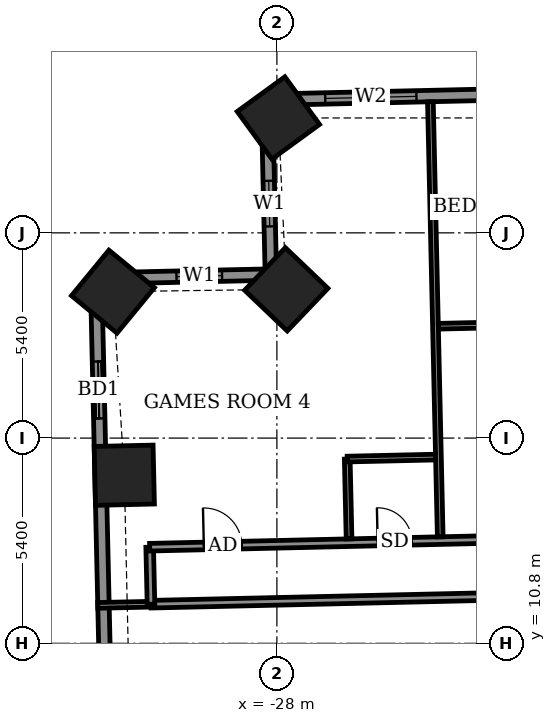
"""IFC4 building model, lengths in metres.
Left out: names, types, materials, properties, quantities, classifications, styles, units other than length and angle.
Written with IfcOpenShell. Run it as: python <this file> out.ifc"""

import sys

from ifc_helpers import new_model, si_unit, direction, frame, frame_2d, origin, origin_2d, place, context, subcontext, project, spatial, rectangle, extrude, element, fill, save


model = new_model("IFC4")
c1 = context("Model", 3, precision=1e-05, world=origin(), true_north=direction((0.0, 1.0)))
c2 = subcontext(c1, "Body", "Model", "MODEL_VIEW")
j1 = project(units=[si_unit("LENGTHUNIT", "METRE"), si_unit("PLANEANGLEUNIT", "RADIAN")], contexts=[c1])
p1 = place(None, origin())
s1 = spatial("IfcSite", under=j1, at=p1, CompositionType="ELEMENT")
p2 = place(p1, origin())
s2 = spatial("IfcBuilding", under=s1, at=p2, CompositionType="ELEMENT")
p3 = place(p2, frame((0.0, 0.0, 34.1)))
s3 = spatial("IfcBuildingStorey", under=s2, at=p3, CompositionType="ELEMENT", Elevation=34.1)
for number, where, z_axis, x_axis in (
    (1, (-27.961, 24.623, -0.55), (0.0, 0.0, 1.0), (-0.808, -0.589, 0.0)),
    (2, (-27.753, 20.115, -0.55), (0.0, 0.0, 1.0), (-0.691, -0.723, 0.0)),
    (3, (-32.313, 20.053, -0.55), (0.0, 0.0, 1.0), (-0.635, -0.772, 0.0)),
    (4, (-32.015, 15.223, -0.55), (0.0, 0.0, 1.0), (0.023, -1.0, 0.0)),
):
    element("IfcColumn", number, at=place(p3, frame(where, z_axis=z_axis, x_axis=x_axis)), inside=s3, PredefinedType="COLUMN", context=c2, shape_type="SweptSolid", body=[
        extrude(rectangle(XDim=1.55, YDim=1.55, at=origin_2d()), origin(), (0.0, 0.0, 1.0), 3.6),
    ])
p4 = place(p3, frame((24.423, 26.298, 0.0), z_axis=(0.0, 0.0, 1.0), x_axis=(-0.999742433108, -0.022695097355, 0.0)))
e5 = element("IfcWall", 5, at=p4, inside=s3, PredefinedType="SOLIDWALL", context=c2, shape_type="SweptSolid", body=[
    extrude(rectangle(XDim=52.701, YDim=0.3, at=frame_2d((26.35, 0.0))), origin(), (0.0, 0.0, 1.0), 3.05),
])
p5 = place(p4, frame((2.357, 0.0, 0.0)))
e6 = element("IfcOpeningElement", 6, at=p5, cuts=e5, PredefinedType="OPENING", context=c2, shape_type="SweptSolid", body=[
    extrude(rectangle(XDim=1.5, YDim=2.4, at=frame_2d((0.75, 1.2))), frame((0.0, 0.16, 0.0), z_axis=(0.0, -1.0, 0.0), x_axis=(1.0, 0.0, 0.0)), (0.0, 0.0, 1.0), 0.32),
])
p6 = place(p4, frame((7.475, 0.0, 0.0)))
e7 = element("IfcOpeningElement", 7, at=p6, cuts=e5, PredefinedType="OPENING", context=c2, shape_type="SweptSolid", body=[
    extrude(rectangle(XDim=1.5, YDim=2.4, at=frame_2d((0.75, 1.2))), frame((0.0, 0.16, 0.0), z_axis=(0.0, -1.0, 0.0), x_axis=(1.0, 0.0, 0.0)), (0.0, 0.0, 1.0), 0.32),
])
p7 = place(p4, frame((10.262, 0.0, 0.0)))
e8 = element("IfcOpeningElement", 8, at=p7, cuts=e5, PredefinedType="OPENING", context=c2, shape_type="SweptSolid", body=[
    extrude(rectangle(XDim=1.5, YDim=2.4, at=frame_2d((0.75, 1.2))), frame((0.0, 0.16, 0.0), z_axis=(0.0, -1.0, 0.0), x_axis=(1.0, 0.0, 0.0)), (0.0, 0.0, 1.0), 0.32),
])
p8 = place(p4, frame((15.1, 0.0, 0.0)))
e9 = element("IfcOpeningElement", 9, at=p8, cuts=e5, PredefinedType="OPENING", context=c2, shape_type="SweptSolid", body=[
    extrude(rectangle(XDim=1.5, YDim=2.4, at=frame_2d((0.75, 1.2))), frame((0.0, 0.16, 0.0), z_axis=(0.0, -1.0, 0.0), x_axis=(1.0, 0.0, 0.0)), (0.0, 0.0, 1.0), 0.32),
])
p9 = place(p4, frame((20.7, 0.0, 0.0)))
e10 = element("IfcOpeningElement", 10, at=p9, cuts=e5, PredefinedType="OPENING", context=c2, shape_type="SweptSolid", body=[
    extrude(rectangle(XDim=1.2, YDim=2.4, at=frame_2d((0.6, 1.2))), frame((0.0, 0.16, 0.0), z_axis=(0.0, -1.0, 0.0), x_axis=(1.0, 0.0, 0.0)), (0.0, 0.0, 1.0), 0.32),
])
p10 = place(p4, frame((23.337, 0.0, 0.0)))
e11 = element("IfcOpeningElement", 11, at=p10, cuts=e5, PredefinedType="OPENING", context=c2, shape_type="SweptSolid", body=[
    extrude(rectangle(XDim=1.5, YDim=2.4, at=frame_2d((0.75, 1.2))), frame((0.0, 0.16, 0.0), z_axis=(0.0, -1.0, 0.0), x_axis=(1.0, 0.0, 0.0)), (0.0, 0.0, 1.0), 0.32),
])
p11 = place(p4, frame((28.238, 0.0, 0.0)))
e12 = element("IfcOpeningElement", 12, at=p11, cuts=e5, PredefinedType="OPENING", context=c2, shape_type="SweptSolid", body=[
    extrude(rectangle(XDim=1.5, YDim=2.4, at=frame_2d((0.75, 1.2))), frame((0.0, 0.16, 0.0), z_axis=(0.0, -1.0, 0.0), x_axis=(1.0, 0.0, 0.0)), (0.0, 0.0, 1.0), 0.32),
])
p12 = place(p4, frame((33.9, 0.0, 0.0)))
e13 = element("IfcOpeningElement", 13, at=p12, cuts=e5, PredefinedType="OPENING", context=c2, shape_type="SweptSolid", body=[
    extrude(rectangle(XDim=1.2, YDim=2.4, at=frame_2d((0.6, 1.2))), frame((0.0, 0.16, 0.0), z_axis=(0.0, -1.0, 0.0), x_axis=(1.0, 0.0, 0.0)), (0.0, 0.0, 1.0), 0.32),
])
p13 = place(p4, frame((36.538, 0.0, 0.0)))
e14 = element("IfcOpeningElement", 14, at=p13, cuts=e5, PredefinedType="OPENING", context=c2, shape_type="SweptSolid", body=[
    extrude(rectangle(XDim=1.5, YDim=2.4, at=frame_2d((0.75, 1.2))), frame((0.0, 0.16, 0.0), z_axis=(0.0, -1.0, 0.0), x_axis=(1.0, 0.0, 0.0)), (0.0, 0.0, 1.0), 0.32),
])
p14 = place(p4, frame((41.338, 0.0, 0.0)))
e15 = element("IfcOpeningElement", 15, at=p14, cuts=e5, PredefinedType="OPENING", context=c2, shape_type="SweptSolid", body=[
    extrude(rectangle(XDim=1.5, YDim=2.4, at=frame_2d((0.75, 1.2))), frame((0.0, 0.16, 0.0), z_axis=(0.0, -1.0, 0.0), x_axis=(1.0, 0.0, 0.0)), (0.0, 0.0, 1.0), 0.32),
])
p15 = place(p4, frame((44.4, 0.0, 0.9)))
e16 = element("IfcOpeningElement", 16, at=p15, cuts=e5, PredefinedType="OPENING", context=c2, shape_type="SweptSolid", body=[
    extrude(rectangle(XDim=0.9, YDim=1.5, at=frame_2d((0.45, 0.75))), frame((0.0, 0.16, 0.0), z_axis=(0.0, -1.0, 0.0), x_axis=(1.0, 0.0, 0.0)), (0.0, 0.0, 1.0), 0.32),
])
p16 = place(p4, frame((48.764, 0.0, 0.9)))
e17 = element("IfcOpeningElement", 17, at=p16, cuts=e5, PredefinedType="OPENING", context=c2, shape_type="SweptSolid", body=[
    extrude(rectangle(XDim=2.4, YDim=1.5, at=frame_2d((1.2, 0.75))), frame((0.0, 0.16, 0.0), z_axis=(0.0, -1.0, 0.0), x_axis=(1.0, 0.0, 0.0)), (0.0, 0.0, 1.0), 0.32),
])
p17 = place(p3, frame((-28.264, 25.102, 0.0), z_axis=(0.0, 0.0, 1.0), x_axis=(0.022820258049, -0.999739584003, 0.0)))
e18 = element("IfcWall", 18, at=p17, inside=s3, PredefinedType="SOLIDWALL", context=c2, shape_type="SweptSolid", body=[
    extrude(rectangle(XDim=4.6, YDim=0.3, at=frame_2d((2.3, 0.0))), origin(), (0.0, 0.0, 1.0), 2.55),
])
p18 = place(p17, frame((2.133, 0.0, 0.9)))
e19 = element("IfcOpeningElement", 19, at=p18, cuts=e18, PredefinedType="OPENING", context=c2, shape_type="SweptSolid", body=[
    extrude(rectangle(XDim=1.2, YDim=1.5, at=frame_2d((0.6, 0.75))), frame((0.0, 0.16, 0.0), z_axis=(0.0, -1.0, 0.0), x_axis=(1.0, 0.0, 0.0)), (0.0, 0.0, 1.0), 0.32),
])
p19 = place(p3, frame((-28.159, 20.503, 0.0), z_axis=(0.0, 0.0, 1.0), x_axis=(-0.999744404568, -0.02260808559, 0.0)))
e20 = element("IfcWall", 20, at=p19, inside=s3, PredefinedType="SOLIDWALL", context=c2, shape_type="SweptSolid", body=[
    extrude(rectangle(XDim=4.6, YDim=0.3, at=frame_2d((2.3, 0.0))), origin(), (0.0, 0.0, 1.0), 3.05),
])
p20 = place(p19, frame((1.284, 0.0, 0.9)))
e21 = element("IfcOpeningElement", 21, at=p20, cuts=e20, PredefinedType="OPENING", context=c2, shape_type="SweptSolid", body=[
    extrude(rectangle(XDim=1.2, YDim=1.5, at=frame_2d((0.6, 0.75))), frame((0.0, 0.16, 0.0), z_axis=(0.0, -1.0, 0.0), x_axis=(1.0, 0.0, 0.0)), (0.0, 0.0, 1.0), 0.32),
])
p21 = place(p3, frame((-32.758, 20.399, 0.0), z_axis=(0.0, 0.0, 1.0), x_axis=(0.022668485183, -0.999743036875, 0.0)))
e22 = element("IfcWall", 22, at=p21, inside=s3, PredefinedType="SOLIDWALL", context=c2, shape_type="SweptSolid", body=[
    extrude(rectangle(XDim=15.929, YDim=0.3, at=frame_2d((7.964, 0.0))), origin(), (0.0, 0.0, 1.0), 3.05),
])
p22 = place(p21, frame((2.183, 0.0, 0.0)))
e23 = element("IfcOpeningElement", 23, at=p22, cuts=e22, PredefinedType="OPENING", context=c2, shape_type="SweptSolid", body=[
    extrude(rectangle(XDim=1.5, YDim=2.4, at=frame_2d((0.75, 1.2))), frame((0.0, 0.16, 0.0), z_axis=(0.0, -1.0, 0.0), x_axis=(1.0, 0.0, 0.0)), (0.0, 0.0, 1.0), 0.32),
])
p23 = place(p21, frame((12.004, 0.0, 0.9)))
e24 = element("IfcOpeningElement", 24, at=p23, cuts=e22, PredefinedType="OPENING", context=c2, shape_type="SweptSolid", body=[
    extrude(rectangle(XDim=2.4, YDim=1.5, at=frame_2d((1.2, 0.75))), frame((0.0, 0.16, 0.0), z_axis=(0.0, -1.0, 0.0), x_axis=(1.0, 0.0, 0.0)), (0.0, 0.0, 1.0), 0.32),
])
p24 = place(p3, frame((-28.446, 26.548, 0.0), z_axis=(0.0, 0.0, 1.0), x_axis=(0.999743608889, 0.022643243723, 0.0)))
e25 = element("IfcWall", 25, at=p24, inside=s3, PredefinedType="USERDEFINED", context=c2, shape_type="SweptSolid", body=[
    extrude(rectangle(XDim=2.199, YDim=0.55, at=frame_2d((1.1, 0.0))), origin(), (0.0, 0.0, 1.0), 0.8),
])
p25 = place(p3, frame((-34.032, 12.618, 0.0), z_axis=(0.0, 0.0, 1.0), x_axis=(-0.022662255828, 0.999743178102, 0.0)))
e26 = element("IfcWall", 26, at=p25, inside=s3, PredefinedType="USERDEFINED", context=c2, shape_type="SweptSolid", body=[
    extrude(rectangle(XDim=6.0, YDim=0.55, at=frame_2d((3.0, 0.0))), origin(), (0.0, 0.0, 1.0), 0.8),
])
p26 = place(p3, frame((-32.713, 11.798, 0.0), z_axis=(0.0, 0.0, 1.0), x_axis=(0.999756172383, 0.022081571112, 0.0)))
e27 = element("IfcWall", 27, at=p26, inside=s3, PredefinedType="PARTITIONING", context=c2, shape_type="SweptSolid", body=[
    extrude(rectangle(XDim=1.404, YDim=0.15, at=frame_2d((0.702, 0.0))), origin(), (0.0, 0.0, 1.0), 2.55),
])
p27 = place(p3, frame((-31.313, 11.829, 0.0), z_axis=(0.0, 0.0, 1.0), x_axis=(0.999742346277, 0.022698921993, 0.0)))
e28 = element("IfcWall", 28, at=p27, inside=s3, PredefinedType="PARTITIONING", context=c2, shape_type="SweptSolid", body=[
    extrude(rectangle(XDim=11.1, YDim=0.2, at=frame_2d((5.55, 0.0))), origin(), (0.0, 0.0, 1.0), 3.05),
])
p28 = place(p3, frame((-31.313, 11.829, 0.0), z_axis=(0.0, 0.0, 1.0), x_axis=(-0.022617910375, 0.999744182344, 0.0)))
e29 = element("IfcWall", 29, at=p28, inside=s3, PredefinedType="PARTITIONING", context=c2, shape_type="SweptSolid", body=[
    extrude(rectangle(XDim=1.5, YDim=0.2, at=frame_2d((0.75, 0.0))), origin(), (0.0, 0.0, 1.0), 3.05),
])
p29 = place(p3, frame((-31.347, 13.329, 0.0), z_axis=(0.0, 0.0, 1.0), x_axis=(0.999742613079, 0.022687168058, 0.0)))
e30 = element("IfcWall", 30, at=p29, inside=s3, PredefinedType="PARTITIONING", context=c2, shape_type="SweptSolid", body=[
    extrude(rectangle(XDim=58.799, YDim=0.2, at=frame_2d((29.399, 0.0))), origin(), (0.0, 0.0, 1.0), 3.05),
])
p30 = place(p29, frame((56.45, 0.0, 0.0)))
e31 = element("IfcOpeningElement", 31, at=p30, cuts=e30, PredefinedType="OPENING", context=c2, shape_type="SweptSolid", body=[
    extrude(rectangle(XDim=1.0, YDim=2.1, at=frame_2d((0.5, 1.05))), frame((0.0, 0.11, 0.0), z_axis=(0.0, -1.0, 0.0), x_axis=(1.0, 0.0, 0.0)), (0.0, 0.0, 1.0), 0.22),
])
p31 = place(p29, frame((51.85, 0.0, 0.0)))
e32 = element("IfcOpeningElement", 32, at=p31, cuts=e30, PredefinedType="OPENING", context=c2, shape_type="SweptSolid", body=[
    extrude(rectangle(XDim=0.9, YDim=2.1, at=frame_2d((0.45, 1.05))), frame((0.0, 0.11, 0.0), z_axis=(0.0, -1.0, 0.0), x_axis=(1.0, 0.0, 0.0)), (0.0, 0.0, 1.0), 0.22),
])
p32 = place(p29, frame((47.1, 0.0, 0.0)))
e33 = element("IfcOpeningElement", 33, at=p32, cuts=e30, PredefinedType="OPENING", context=c2, shape_type="SweptSolid", body=[
    extrude(rectangle(XDim=0.9, YDim=2.1, at=frame_2d((0.45, 1.05))), frame((0.0, 0.11, 0.0), z_axis=(0.0, -1.0, 0.0), x_axis=(1.0, 0.0, 0.0)), (0.0, 0.0, 1.0), 0.22),
])
p33 = place(p29, frame((45.225, 0.0, 0.0)))
e34 = element("IfcOpeningElement", 34, at=p33, cuts=e30, PredefinedType="OPENING", context=c2, shape_type="SweptSolid", body=[
    extrude(rectangle(XDim=0.9, YDim=2.1, at=frame_2d((0.45, 1.05))), frame((0.0, 0.11, 0.0), z_axis=(0.0, -1.0, 0.0), x_axis=(1.0, 0.0, 0.0)), (0.0, 0.0, 1.0), 0.22),
])
p34 = place(p29, frame((38.55, 0.0, 0.0)))
e35 = element("IfcOpeningElement", 35, at=p34, cuts=e30, PredefinedType="OPENING", context=c2, shape_type="SweptSolid", body=[
    extrude(rectangle(XDim=0.9, YDim=2.1, at=frame_2d((0.45, 1.05))), frame((0.0, 0.11, 0.0), z_axis=(0.0, -1.0, 0.0), x_axis=(1.0, 0.0, 0.0)), (0.0, 0.0, 1.0), 0.22),
])
p35 = place(p29, frame((36.625, 0.0, 0.0)))
e36 = element("IfcOpeningElement", 36, at=p35, cuts=e30, PredefinedType="OPENING", context=c2, shape_type="SweptSolid", body=[
    extrude(rectangle(XDim=0.9, YDim=2.1, at=frame_2d((0.45, 1.05))), frame((0.0, 0.11, 0.0), z_axis=(0.0, -1.0, 0.0), x_axis=(1.0, 0.0, 0.0)), (0.0, 0.0, 1.0), 0.22),
])
p36 = place(p29, frame((29.875, 0.0, 0.0)))
e37 = element("IfcOpeningElement", 37, at=p36, cuts=e30, PredefinedType="OPENING", context=c2, shape_type="SweptSolid", body=[
    extrude(rectangle(XDim=0.9, YDim=2.1, at=frame_2d((0.45, 1.05))), frame((0.0, 0.11, 0.0), z_axis=(0.0, -1.0, 0.0), x_axis=(1.0, 0.0, 0.0)), (0.0, 0.0, 1.0), 0.22),
])
p37 = place(p29, frame((27.9, 0.0, 0.0)))
e38 = element("IfcOpeningElement", 38, at=p37, cuts=e30, PredefinedType="OPENING", context=c2, shape_type="SweptSolid", body=[
    extrude(rectangle(XDim=0.9, YDim=2.1, at=frame_2d((0.45, 1.05))), frame((0.0, 0.11, 0.0), z_axis=(0.0, -1.0, 0.0), x_axis=(1.0, 0.0, 0.0)), (0.0, 0.0, 1.0), 0.22),
])
p38 = place(p29, frame((21.1, 0.0, 0.0)))
e39 = element("IfcOpeningElement", 39, at=p38, cuts=e30, PredefinedType="OPENING", context=c2, shape_type="SweptSolid", body=[
    extrude(rectangle(XDim=0.9, YDim=2.1, at=frame_2d((0.45, 1.05))), frame((0.0, 0.11, 0.0), z_axis=(0.0, -1.0, 0.0), x_axis=(1.0, 0.0, 0.0)), (0.0, 0.0, 1.0), 0.22),
])
p39 = place(p29, frame((19.175, 0.0, 0.0)))
e40 = element("IfcOpeningElement", 40, at=p39, cuts=e30, PredefinedType="OPENING", context=c2, shape_type="SweptSolid", body=[
    extrude(rectangle(XDim=0.9, YDim=2.1, at=frame_2d((0.45, 1.05))), frame((0.0, 0.11, 0.0), z_axis=(0.0, -1.0, 0.0), x_axis=(1.0, 0.0, 0.0)), (0.0, 0.0, 1.0), 0.22),
])
p40 = place(p29, frame((12.5, 0.0, 0.0)))
e41 = element("IfcOpeningElement", 41, at=p40, cuts=e30, PredefinedType="OPENING", context=c2, shape_type="SweptSolid", body=[
    extrude(rectangle(XDim=0.9, YDim=2.1, at=frame_2d((0.45, 1.05))), frame((0.0, 0.11, 0.0), z_axis=(0.0, -1.0, 0.0), x_axis=(1.0, 0.0, 0.0)), (0.0, 0.0, 1.0), 0.22),
])
p41 = place(p29, frame((10.575, 0.0, 0.0)))
e42 = element("IfcOpeningElement", 42, at=p41, cuts=e30, PredefinedType="OPENING", context=c2, shape_type="SweptSolid", body=[
    extrude(rectangle(XDim=0.9, YDim=2.1, at=frame_2d((0.45, 1.05))), frame((0.0, 0.11, 0.0), z_axis=(0.0, -1.0, 0.0), x_axis=(1.0, 0.0, 0.0)), (0.0, 0.0, 1.0), 0.22),
])
p42 = place(p29, frame((1.425, 0.0, 0.0)))
e43 = element("IfcOpeningElement", 43, at=p42, cuts=e30, PredefinedType="OPENING", context=c2, shape_type="SweptSolid", body=[
    extrude(rectangle(XDim=1.0, YDim=2.1, at=frame_2d((0.5, 1.05))), frame((0.0, 0.11, 0.0), z_axis=(0.0, -1.0, 0.0), x_axis=(1.0, 0.0, 0.0)), (0.0, 0.0, 1.0), 0.22),
])
p43 = place(p29, frame((6.0, 0.0, 0.0)))
e44 = element("IfcOpeningElement", 44, at=p43, cuts=e30, PredefinedType="OPENING", context=c2, shape_type="SweptSolid", body=[
    extrude(rectangle(XDim=0.9, YDim=2.1, at=frame_2d((0.45, 1.05))), frame((0.0, 0.11, 0.0), z_axis=(0.0, -1.0, 0.0), x_axis=(1.0, 0.0, 0.0)), (0.0, 0.0, 1.0), 0.22),
])
p44 = place(p3, frame((-26.101, 13.548, 0.0), z_axis=(0.0, 0.0, 1.0), x_axis=(-0.022782133344, 0.999740453518, 0.0)))
e45 = element("IfcWall", 45, at=p44, inside=s3, PredefinedType="PARTITIONING", context=c2, shape_type="SweptSolid", body=[
    extrude(rectangle(XDim=2.1, YDim=0.15, at=frame_2d((1.05, 0.0))), origin(), (0.0, 0.0, 1.0), 3.05),
])
p45 = place(p3, frame((-23.702, 13.602, 0.0), z_axis=(0.0, 0.0, 1.0), x_axis=(-0.022621153305, 0.999744108971, 0.0)))
e46 = element("IfcWall", 46, at=p45, inside=s3, PredefinedType="PARTITIONING", context=c2, shape_type="SweptSolid", body=[
    extrude(rectangle(XDim=11.451, YDim=0.15, at=frame_2d((5.726, 0.0))), origin(), (0.0, 0.0, 1.0), 2.55),
])
p46 = place(p3, frame((-26.149, 15.648, 0.0), z_axis=(0.0, 0.0, 1.0), x_axis=(0.999749954681, 0.022361308448, 0.0)))
e47 = element("IfcWall", 47, at=p46, inside=s3, PredefinedType="PARTITIONING", context=c2, shape_type="SweptSolid", body=[
    extrude(rectangle(XDim=2.325, YDim=0.15, at=frame_2d((1.163, 0.0))), origin(), (0.0, 0.0, 1.0), 3.05),
])
p47 = place(p3, frame((-23.752, 19.143, 0.0), z_axis=(0.0, 0.0, 1.0), x_axis=(0.999740260747, 0.02279059109, 0.0)))
e48 = element("IfcWall", 48, at=p47, inside=s3, PredefinedType="PARTITIONING", context=c2, shape_type="SweptSolid", body=[
    extrude(rectangle(XDim=2.324, YDim=0.15, at=frame_2d((1.162, 0.0))), origin(), (0.0, 0.0, 1.0), 3.05),
])
p48 = place(p16, origin())
e49 = element("IfcWindow", 49, at=p48, inside=s3, PartitioningType="DOUBLE_PANEL_VERTICAL", PredefinedType="WINDOW", context=c2, shape_type="SweptSolid", body=[
    extrude(rectangle(XDim=2.4, YDim=1.5, at=frame_2d((1.2, 0.75))), frame((0.0, 0.03, 0.0), z_axis=(0.0, -1.0, 0.0), x_axis=(1.0, 0.0, 0.0)), (0.0, 0.0, 1.0), 0.06),
])
fill(e17, e49)
p49 = place(p18, origin())
e50 = element("IfcWindow", 50, at=p49, inside=s3, PartitioningType="SINGLE_PANEL", PredefinedType="WINDOW", context=c2, shape_type="SweptSolid", body=[
    extrude(rectangle(XDim=1.2, YDim=1.5, at=frame_2d((0.6, 0.75))), frame((0.0, 0.03, 0.0), z_axis=(0.0, -1.0, 0.0), x_axis=(1.0, 0.0, 0.0)), (0.0, 0.0, 1.0), 0.06),
])
fill(e19, e50)
p50 = place(p20, origin())
e51 = element("IfcWindow", 51, at=p50, inside=s3, PartitioningType="SINGLE_PANEL", PredefinedType="WINDOW", context=c2, shape_type="SweptSolid", body=[
    extrude(rectangle(XDim=1.2, YDim=1.5, at=frame_2d((0.6, 0.75))), frame((0.0, 0.03, 0.0), z_axis=(0.0, -1.0, 0.0), x_axis=(1.0, 0.0, 0.0)), (0.0, 0.0, 1.0), 0.06),
])
fill(e21, e51)
p51 = place(p22, origin())
e52 = element("IfcDoor", 52, at=p51, inside=s3, OperationType="SLIDING_TO_LEFT", PredefinedType="DOOR", context=c2, shape_type="SweptSolid", body=[
    extrude(rectangle(XDim=1.5, YDim=2.4, at=frame_2d((0.75, 1.2))), frame((0.0, 0.025, 0.0), z_axis=(0.0, -1.0, 0.0), x_axis=(1.0, 0.0, 0.0)), (0.0, 0.0, 1.0), 0.05),
])
fill(e23, e52)
p52 = place(p42, origin())
e53 = element("IfcDoor", 53, at=p52, inside=s3, OperationType="SINGLE_SWING_RIGHT", PredefinedType="DOOR", context=c2, shape_type="SweptSolid", body=[
    extrude(rectangle(XDim=1.0, YDim=2.1, at=frame_2d((0.5, 1.05))), frame((0.0, 0.025, 0.0), z_axis=(0.0, -1.0, 0.0), x_axis=(1.0, 0.0, 0.0)), (0.0, 0.0, 1.0), 0.05),
])
fill(e43, e53)
p53 = place(p43, origin())
e54 = element("IfcDoor", 54, at=p53, inside=s3, OperationType="SINGLE_SWING_LEFT", PredefinedType="DOOR", context=c2, shape_type="SweptSolid", body=[
    extrude(rectangle(XDim=0.9, YDim=2.1, at=frame_2d((0.45, 1.05))), frame((0.0, 0.025, 0.0), z_axis=(0.0, -1.0, 0.0), x_axis=(1.0, 0.0, 0.0)), (0.0, 0.0, 1.0), 0.05),
])
fill(e44, e54)
save(model, sys.argv[1])
